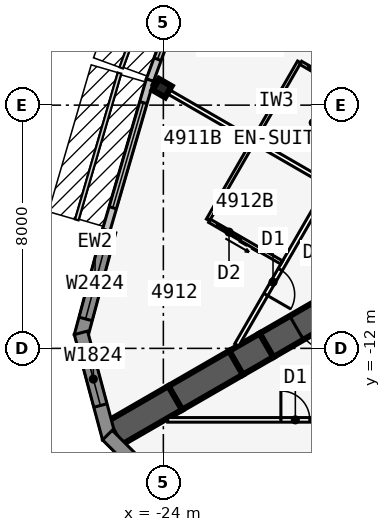
"""IFC4 building model, lengths in metres.
Left out: names, types, materials, properties, quantities, classifications, styles, units other than length and angle.
Written with IfcOpenShell. Run it as: python <this file> out.ifc"""

import sys

from ifc_helpers import new_model, si_unit, direction, frame, frame_2d, origin, origin_2d, place, context, subcontext, project, spatial, polyline, rectangle, i_section, outline, extrude, element, fill, save


model = new_model("IFC4")
c1 = context("Model", 3, precision=1e-05, world=origin(), true_north=direction((0.0, 1.0)))
c2 = subcontext(c1, "Body", "Model", "MODEL_VIEW")
j1 = project(units=[si_unit("LENGTHUNIT", "METRE"), si_unit("PLANEANGLEUNIT", "RADIAN")], contexts=[c1])
p1 = place(None, origin())
s1 = spatial("IfcSite", under=j1, at=p1, CompositionType="ELEMENT")
p2 = place(p1, origin())
s2 = spatial("IfcBuilding", under=s1, at=p2, CompositionType="ELEMENT")
p3 = place(p2, frame((0.0, 0.0, 182.7)))
s3 = spatial("IfcBuildingStorey", under=s2, at=p3, CompositionType="ELEMENT", Elevation=182.7)
p4 = place(p3, frame((-16.5, -9.526, 0.0), z_axis=(0.0, 0.0, 1.0), x_axis=(-0.866031398331, -0.499989616998, 0.0)))
e1 = element("IfcWall", 1, at=p4, inside=s3, PredefinedType="SHEAR", context=c2, shape_type="SweptSolid", body=[
    extrude(rectangle(XDim=4.746, YDim=0.9, at=frame_2d((2.373, 0.0))), origin(), (0.0, 0.0, 1.0), 3.4),
])
p5 = place(p4, frame((1.8, 0.0, 0.0)))
e2 = element("IfcOpeningElement", 2, at=p5, cuts=e1, PredefinedType="OPENING", context=c2, shape_type="SweptSolid", body=[
    extrude(rectangle(XDim=1.8, YDim=2.13, at=frame_2d((0.9, 1.065))), frame((0.0, 0.46, 0.0), z_axis=(0.0, -1.0, 0.0), x_axis=(1.0, 0.0, 0.0)), (0.0, 0.0, 1.0), 0.92),
])
p6 = place(p3, frame((-20.61, -11.899, 0.0), z_axis=(0.0, 0.0, 1.0), x_axis=(-0.866009537788, -0.500027479704, 0.0)))
e3 = element("IfcWall", 3, at=p6, inside=s3, PredefinedType="SHEAR", context=c2, shape_type="SweptSolid", body=[
    extrude(rectangle(XDim=1.155, YDim=0.9, at=frame_2d((0.577, 0.0))), origin(), (0.0, 0.0, 1.0), 3.4),
])
for number, where, z_axis, x_axis in (
    (4, (-21.61, -12.477, 0.0), (0.0, 0.0, 1.0), (-0.866, -0.5, 0.0)),
    (5, (-23.61, -13.631, 0.0), (0.0, 0.0, 1.0), (-0.866, -0.5, 0.0)),
):
    element("IfcWall", number, at=place(p3, frame(where, z_axis=z_axis, x_axis=x_axis)), inside=s3, PredefinedType="SHEAR", context=c2, shape_type="SweptSolid", body=[
        extrude(rectangle(XDim=2.309, YDim=0.9, at=frame_2d((1.155, 0.0))), origin(), (0.0, 0.0, 1.0), 3.4),
    ])
p7 = place(p3, frame((-24.041, -3.44, 0.0), z_axis=(0.0, 0.0, 1.0), x_axis=(-0.5, -0.866025403784, 0.0)))
e6 = element("IfcColumn", 6, at=p7, inside=s3, PredefinedType="COLUMN", context=c2, shape_type="SweptSolid", body=[
    extrude(i_section(OverallWidth=0.424, OverallDepth=0.475, WebThickness=0.048, FlangeThickness=0.077, at=origin_2d()), origin(), (0.0, 0.0, 1.0), 3.4),
])
p8 = place(p3, frame((-22.701, 1.584, 0.0), z_axis=(0.0, 0.0, 1.0), x_axis=(-0.343225593282, -0.939252996863, 0.0)))
e7 = element("IfcWall", 7, at=p8, inside=s3, PredefinedType="STANDARD", context=c2, shape_type="SweptSolid", body=[
    extrude(rectangle(XDim=5.076, YDim=0.25, at=frame_2d((2.538, 0.0))), origin(), (0.0, 0.0, 1.0), 3.235),
])
p9 = place(p8, frame((0.738, 0.0, 0.45)))
e8 = element("IfcOpeningElement", 8, at=p9, cuts=e7, PredefinedType="OPENING", context=c2, shape_type="SweptSolid", body=[
    extrude(rectangle(XDim=3.6, YDim=2.4, at=frame_2d((1.8, 1.2))), frame((0.0, 0.135, 0.0), z_axis=(0.0, -1.0, 0.0), x_axis=(1.0, 0.0, 0.0)), (0.0, 0.0, 1.0), 0.27),
])
p10 = place(p3, frame((-24.441, -3.175, 0.0), z_axis=(0.0, 0.0, 1.0), x_axis=(-0.279528287117, -0.960137457191, 0.0)))
e9 = element("IfcWall", 9, at=p10, inside=s3, PredefinedType="STANDARD", context=c2, shape_type="SweptSolid", body=[
    extrude(rectangle(XDim=5.148, YDim=0.25, at=frame_2d((2.574, 0.0))), origin(), (0.0, 0.0, 1.0), 3.235),
])
p11 = place(p10, frame((0.774, 0.0, 0.45)))
e10 = element("IfcOpeningElement", 10, at=p11, cuts=e9, PredefinedType="OPENING", context=c2, shape_type="SweptSolid", body=[
    extrude(rectangle(XDim=3.6, YDim=2.4, at=frame_2d((1.8, 1.2))), frame((0.0, 0.135, 0.0), z_axis=(0.0, -1.0, 0.0), x_axis=(1.0, 0.0, 0.0)), (0.0, 0.0, 1.0), 0.27),
])
p12 = place(p3, frame((-25.783, -8.141, 0.0), z_axis=(0.0, 0.0, 1.0), x_axis=(-0.258823421857, -0.965924653531, 0.0)))
e11 = element("IfcWall", 11, at=p12, inside=s3, PredefinedType="SOLIDWALL", context=c2, shape_type="SweptSolid", body=[
    extrude(rectangle(XDim=3.586, YDim=0.45, at=frame_2d((1.793, 0.0))), origin(), (0.0, 0.0, 1.0), 3.235),
])
p13 = place(p12, frame((0.593, 0.0, 0.45)))
e12 = element("IfcOpeningElement", 12, at=p13, cuts=e11, PredefinedType="OPENING", context=c2, shape_type="SweptSolid", body=[
    extrude(rectangle(XDim=2.4, YDim=2.4, at=frame_2d((1.2, 1.2))), frame((0.0, 0.235, 0.0), z_axis=(0.0, -1.0, 0.0), x_axis=(1.0, 0.0, 0.0)), (0.0, 0.0, 1.0), 0.47),
])
p14 = place(p3, frame((-26.711, -11.489, 0.0), z_axis=(0.0, 0.0, 1.0), x_axis=(0.258823421857, -0.965924653531, 0.0)))
e13 = element("IfcWall", 13, at=p14, inside=s3, PredefinedType="SOLIDWALL", context=c2, shape_type="SweptSolid", body=[
    extrude(outline(polyline([(3.586, 0.225), (3.527, 0.225), (3.035, 0.093), (3.0, 0.225), (0.0, 0.225), (0.0, -0.225), (3.586, -0.225), (3.586, 0.225)])), origin(), (0.0, 0.0, 1.0), 3.235),
])
p15 = place(p14, frame((0.675, 0.0, 0.45)))
e14 = element("IfcOpeningElement", 14, at=p15, cuts=e13, PredefinedType="OPENING", context=c2, shape_type="SweptSolid", body=[
    extrude(rectangle(XDim=1.8, YDim=2.4, at=frame_2d((0.9, 1.2))), frame((0.0, 0.235, 0.0), z_axis=(0.0, -1.0, 0.0), x_axis=(1.0, 0.0, 0.0)), (0.0, 0.0, 1.0), 0.47),
])
p16 = place(p3, frame((-25.841, -14.852, 0.0), z_axis=(0.0, 0.0, 1.0), x_axis=(0.707106781187, -0.707106781187, 0.0)))
e15 = element("IfcWall", 15, at=p16, inside=s3, PredefinedType="SOLIDWALL", context=c2, shape_type="SweptSolid", body=[
    extrude(outline(polyline([(3.586, 0.225), (0.586, 0.225), (0.551, 0.093), (0.059, 0.225), (0.0, 0.225), (0.0, -0.225), (3.586, -0.225), (3.586, 0.225)])), origin(), (0.0, 0.0, 1.0), 3.235),
])
p17 = place(p16, frame((1.111, 0.0, 0.45)))
e16 = element("IfcOpeningElement", 16, at=p17, cuts=e15, PredefinedType="OPENING", context=c2, shape_type="SweptSolid", body=[
    extrude(rectangle(XDim=1.8, YDim=2.4, at=frame_2d((0.9, 1.2))), frame((0.0, 0.235, 0.0), z_axis=(0.0, -1.0, 0.0), x_axis=(1.0, 0.0, 0.0)), (0.0, 0.0, 1.0), 0.47),
])
p18 = place(p3, frame((-23.857, -14.351, 0.0), z_axis=(0.0, 0.0, 1.0), x_axis=(1.0, 0.0, 0.0)))
e17 = element("IfcWall", 17, at=p18, inside=s3, PredefinedType="PARTITIONING", context=c2, shape_type="SweptSolid", body=[
    extrude(rectangle(XDim=47.714, YDim=0.15, at=frame_2d((23.857, 0.0))), origin(), (0.0, 0.0, 1.0), 3.235),
])
p19 = place(p18, frame((3.723, 0.0, 0.0)))
e18 = element("IfcOpeningElement", 18, at=p19, cuts=e17, PredefinedType="OPENING", context=c2, shape_type="SweptSolid", body=[
    extrude(rectangle(XDim=0.95, YDim=2.13, at=frame_2d((0.475, 1.065))), frame((0.0, 0.085, 0.0), z_axis=(0.0, -1.0, 0.0), x_axis=(1.0, 0.0, 0.0)), (0.0, 0.0, 1.0), 0.17),
])
p20 = place(p18, frame((17.082, 0.0, 0.0)))
e19 = element("IfcOpeningElement", 19, at=p20, cuts=e17, PredefinedType="OPENING", context=c2, shape_type="SweptSolid", body=[
    extrude(rectangle(XDim=0.95, YDim=2.13, at=frame_2d((0.475, 1.065))), frame((0.0, 0.085, 0.0), z_axis=(0.0, -1.0, 0.0), x_axis=(1.0, 0.0, 0.0)), (0.0, 0.0, 1.0), 0.17),
])
p21 = place(p18, frame((25.857, 0.0, 0.0)))
e20 = element("IfcOpeningElement", 20, at=p21, cuts=e17, PredefinedType="OPENING", context=c2, shape_type="SweptSolid", body=[
    extrude(rectangle(XDim=1.0, YDim=2.13, at=frame_2d((0.5, 1.065))), frame((0.0, 0.085, 0.0), z_axis=(0.0, -1.0, 0.0), x_axis=(1.0, 0.0, 0.0)), (0.0, 0.0, 1.0), 0.17),
])
p22 = place(p18, frame((30.882, 0.0, 0.0)))
e21 = element("IfcOpeningElement", 21, at=p22, cuts=e17, PredefinedType="OPENING", context=c2, shape_type="SweptSolid", body=[
    extrude(rectangle(XDim=0.95, YDim=2.13, at=frame_2d((0.475, 1.065))), frame((0.0, 0.085, 0.0), z_axis=(0.0, -1.0, 0.0), x_axis=(1.0, 0.0, 0.0)), (0.0, 0.0, 1.0), 0.17),
])
p23 = place(p18, frame((42.082, 0.0, 0.0)))
e22 = element("IfcOpeningElement", 22, at=p23, cuts=e17, PredefinedType="OPENING", context=c2, shape_type="SweptSolid", body=[
    extrude(rectangle(XDim=0.95, YDim=2.13, at=frame_2d((0.475, 1.065))), frame((0.0, 0.085, 0.0), z_axis=(0.0, -1.0, 0.0), x_axis=(1.0, 0.0, 0.0)), (0.0, 0.0, 1.0), 0.17),
])
p24 = place(p3, frame((-0.5, 24.636, 0.0), z_axis=(0.0, 0.0, 1.0), x_axis=(-0.500001915564, -0.86602429783, 0.0)))
e23 = element("IfcWall", 23, at=p24, inside=s3, PredefinedType="PARTITIONING", context=c2, shape_type="SweptSolid", body=[
    extrude(rectangle(XDim=42.172, YDim=0.15, at=frame_2d((21.086, 0.0))), origin(), (0.0, 0.0, 1.0), 3.235),
])
p25 = place(p24, frame((2.338, 0.0, 0.0)))
e24 = element("IfcOpeningElement", 24, at=p25, cuts=e23, PredefinedType="OPENING", context=c2, shape_type="SweptSolid", body=[
    extrude(rectangle(XDim=0.95, YDim=2.13, at=frame_2d((0.475, 1.065))), frame((0.0, 0.085, 0.0), z_axis=(0.0, -1.0, 0.0), x_axis=(1.0, 0.0, 0.0)), (0.0, 0.0, 1.0), 0.17),
])
p26 = place(p24, frame((18.111, 0.0, 0.0)))
e25 = element("IfcOpeningElement", 25, at=p26, cuts=e23, PredefinedType="OPENING", context=c2, shape_type="SweptSolid", body=[
    extrude(rectangle(XDim=0.95, YDim=2.13, at=frame_2d((0.475, 1.065))), frame((0.0, 0.085, 0.0), z_axis=(0.0, -1.0, 0.0), x_axis=(1.0, 0.0, 0.0)), (0.0, 0.0, 1.0), 0.17),
])
p27 = place(p24, frame((28.111, 0.0, 0.0)))
e26 = element("IfcOpeningElement", 26, at=p27, cuts=e23, PredefinedType="OPENING", context=c2, shape_type="SweptSolid", body=[
    extrude(rectangle(XDim=0.95, YDim=2.13, at=frame_2d((0.475, 1.065))), frame((0.0, 0.085, 0.0), z_axis=(0.0, -1.0, 0.0), x_axis=(1.0, 0.0, 0.0)), (0.0, 0.0, 1.0), 0.17),
])
p28 = place(p24, frame((39.311, 0.0, 0.0)))
e27 = element("IfcOpeningElement", 27, at=p28, cuts=e23, PredefinedType="OPENING", context=c2, shape_type="SweptSolid", body=[
    extrude(rectangle(XDim=0.95, YDim=2.13, at=frame_2d((0.475, 1.065))), frame((0.0, 0.085, 0.0), z_axis=(0.0, -1.0, 0.0), x_axis=(1.0, 0.0, 0.0)), (0.0, 0.0, 1.0), 0.17),
])
p29 = place(p3, frame((-16.108, -2.247, 0.0), z_axis=(0.0, 0.0, 1.0), x_axis=(-0.866025567496, 0.499999716443, 0.0)))
e28 = element("IfcWall", 28, at=p29, inside=s3, PredefinedType="PARTITIONING", context=c2, shape_type="SweptSolid", body=[
    extrude(rectangle(XDim=7.495, YDim=0.1, at=frame_2d((3.748, 0.0))), origin(), (0.0, 0.0, 1.0), 2.389),
])
p30 = place(p29, frame((0.45, 0.0, 0.0)))
e29 = element("IfcOpeningElement", 29, at=p30, cuts=e28, PredefinedType="OPENING", context=c2, shape_type="SweptSolid", body=[
    extrude(rectangle(XDim=0.9, YDim=2.13, at=frame_2d((0.45, 1.065))), frame((0.0, 0.06, 0.0), z_axis=(0.0, -1.0, 0.0), x_axis=(1.0, 0.0, 0.0)), (0.0, 0.0, 1.0), 0.12),
])
p31 = place(p3, frame((-18.608, -6.577, 0.0), z_axis=(0.0, 0.0, 1.0), x_axis=(-0.866031967744, 0.499988630717, 0.0)))
e30 = element("IfcWall", 30, at=p31, inside=s3, PredefinedType="PARTITIONING", context=c2, shape_type="SweptSolid", body=[
    extrude(rectangle(XDim=6.616, YDim=0.15, at=frame_2d((3.308, 0.0))), origin(), (0.0, 0.0, 1.0), 2.389),
])
p32 = place(p3, frame((-19.533, -2.579, 0.0), z_axis=(0.0, 0.0, 1.0), x_axis=(-0.499990139034, -0.866031096941, 0.0)))
e31 = element("IfcWall", 31, at=p32, inside=s3, PredefinedType="PLUMBINGWALL", context=c2, shape_type="SweptSolid", body=[
    extrude(rectangle(XDim=3.0, YDim=0.12, at=frame_2d((1.5, 0.0))), origin(), (0.0, 0.0, 1.0), 3.235),
])
p33 = place(p3, frame((-17.108, -3.979, 0.0), z_axis=(0.0, 0.0, 1.0), x_axis=(-0.865997131366, 0.500048966069, 0.0)))
e32 = element("IfcWall", 32, at=p33, inside=s3, PredefinedType="PLUMBINGWALL", context=c2, shape_type="SweptSolid", body=[
    extrude(rectangle(XDim=2.74, YDim=0.12, at=frame_2d((1.37, 0.0))), origin(), (0.0, 0.0, 1.0), 3.235),
])
p34 = place(p33, frame((1.55, 0.0, 0.0)))
e33 = element("IfcOpeningElement", 33, at=p34, cuts=e32, PredefinedType="OPENING", context=c2, shape_type="SweptSolid", body=[
    extrude(rectangle(XDim=0.9, YDim=2.13, at=frame_2d((0.45, 1.065))), frame((0.0, 0.07, 0.0), z_axis=(0.0, -1.0, 0.0), x_axis=(1.0, 0.0, 0.0)), (0.0, 0.0, 1.0), 0.14),
])
p35 = place(p3, frame((-21.033, -5.177, 0.0), z_axis=(0.0, 0.0, 1.0), x_axis=(-0.499990139034, -0.866031096941, 0.0)))
e34 = element("IfcWall", 34, at=p35, inside=s3, PredefinedType="PLUMBINGWALL", context=c2, shape_type="SweptSolid", body=[
    extrude(rectangle(XDim=3.0, YDim=0.12, at=frame_2d((1.5, 0.0))), origin(), (0.0, 0.0, 1.0), 3.235),
])
p36 = place(p3, frame((-20.108, -9.175, 0.0), z_axis=(0.0, 0.0, 1.0), x_axis=(-0.866035715982, 0.499982138324, 0.0)))
e35 = element("IfcWall", 35, at=p36, inside=s3, PredefinedType="PLUMBINGWALL", context=c2, shape_type="SweptSolid", body=[
    extrude(rectangle(XDim=2.74, YDim=0.12, at=frame_2d((1.37, 0.0))), origin(), (0.0, 0.0, 1.0), 3.235),
])
p37 = place(p36, frame((1.55, 0.0, 0.0)))
e36 = element("IfcOpeningElement", 36, at=p37, cuts=e35, PredefinedType="OPENING", context=c2, shape_type="SweptSolid", body=[
    extrude(rectangle(XDim=0.9, YDim=2.13, at=frame_2d((0.45, 1.065))), frame((0.0, 0.07, 0.0), z_axis=(0.0, -1.0, 0.0), x_axis=(1.0, 0.0, 0.0)), (0.0, 0.0, 1.0), 0.14),
])
p38 = place(p9, origin())
e37 = element("IfcWindow", 37, at=p38, inside=s3, PartitioningType="SINGLE_PANEL", PredefinedType="WINDOW", context=c2, shape_type="SweptSolid", body=[
    extrude(rectangle(XDim=3.6, YDim=2.4, at=frame_2d((1.8, 1.2))), frame((0.0, 0.03, 0.0), z_axis=(0.0, -1.0, 0.0), x_axis=(1.0, 0.0, 0.0)), (0.0, 0.0, 1.0), 0.06),
])
fill(e8, e37)
p39 = place(p11, origin())
e38 = element("IfcWindow", 38, at=p39, inside=s3, PartitioningType="SINGLE_PANEL", PredefinedType="WINDOW", context=c2, shape_type="SweptSolid", body=[
    extrude(rectangle(XDim=3.6, YDim=2.4, at=frame_2d((1.8, 1.2))), frame((0.0, 0.03, 0.0), z_axis=(0.0, -1.0, 0.0), x_axis=(1.0, 0.0, 0.0)), (0.0, 0.0, 1.0), 0.06),
])
fill(e10, e38)
p40 = place(p13, origin())
e39 = element("IfcWindow", 39, at=p40, inside=s3, PartitioningType="SINGLE_PANEL", PredefinedType="WINDOW", context=c2, shape_type="SweptSolid", body=[
    extrude(rectangle(XDim=2.4, YDim=2.4, at=frame_2d((1.2, 1.2))), frame((0.0, 0.03, 0.0), z_axis=(0.0, -1.0, 0.0), x_axis=(1.0, 0.0, 0.0)), (0.0, 0.0, 1.0), 0.06),
])
fill(e12, e39)
p41 = place(p15, origin())
e40 = element("IfcWindow", 40, at=p41, inside=s3, PartitioningType="SINGLE_PANEL", PredefinedType="WINDOW", context=c2, shape_type="SweptSolid", body=[
    extrude(rectangle(XDim=1.8, YDim=2.4, at=frame_2d((0.9, 1.2))), frame((0.0, 0.03, 0.0), z_axis=(0.0, -1.0, 0.0), x_axis=(1.0, 0.0, 0.0)), (0.0, 0.0, 1.0), 0.06),
])
fill(e14, e40)
p42 = place(p19, origin())
e41 = element("IfcDoor", 41, at=p42, inside=s3, OperationType="SINGLE_SWING_LEFT", PredefinedType="DOOR", context=c2, shape_type="SweptSolid", body=[
    extrude(rectangle(XDim=0.95, YDim=2.13, at=frame_2d((0.475, 1.065))), frame((0.0, 0.025, 0.0), z_axis=(0.0, -1.0, 0.0), x_axis=(1.0, 0.0, 0.0)), (0.0, 0.0, 1.0), 0.05),
])
fill(e18, e41)
p43 = place(p34, origin())
e42 = element("IfcDoor", 42, at=p43, inside=s3, OperationType="SLIDING_TO_LEFT", PredefinedType="DOOR", context=c2, shape_type="SweptSolid", body=[
    extrude(rectangle(XDim=0.9, YDim=2.13, at=frame_2d((0.45, 1.065))), frame((0.0, 0.025, 0.0), z_axis=(0.0, -1.0, 0.0), x_axis=(1.0, 0.0, 0.0)), (0.0, 0.0, 1.0), 0.05),
])
fill(e33, e42)
p44 = place(p37, origin())
e43 = element("IfcDoor", 43, at=p44, inside=s3, OperationType="SLIDING_TO_LEFT", PredefinedType="DOOR", context=c2, shape_type="SweptSolid", body=[
    extrude(rectangle(XDim=0.9, YDim=2.13, at=frame_2d((0.45, 1.065))), frame((0.0, 0.025, 0.0), z_axis=(0.0, -1.0, 0.0), x_axis=(1.0, 0.0, 0.0)), (0.0, 0.0, 1.0), 0.05),
])
fill(e36, e43)
p45 = place(p28, origin())
e44 = element("IfcDoor", 44, at=p45, inside=s3, OperationType="SINGLE_SWING_RIGHT", PredefinedType="DOOR", context=c2, shape_type="SweptSolid", body=[
    extrude(rectangle(XDim=0.95, YDim=2.13, at=frame_2d((0.475, 1.065))), frame((0.0, 0.025, 0.0), z_axis=(0.0, -1.0, 0.0), x_axis=(1.0, 0.0, 0.0)), (0.0, 0.0, 1.0), 0.05),
])
fill(e27, e44)
p46 = place(p5, origin())
e45 = element("IfcDoor", 45, at=p46, inside=s3, OperationType="DOUBLE_DOOR_DOUBLE_SWING", PredefinedType="DOOR", context=c2, shape_type="SweptSolid", body=[
    extrude(rectangle(XDim=1.8, YDim=2.13, at=frame_2d((0.9, 1.065))), frame((0.0, 0.025, 0.0), z_axis=(0.0, -1.0, 0.0), x_axis=(1.0, 0.0, 0.0)), (0.0, 0.0, 1.0), 0.05),
])
fill(e2, e45)
save(model, sys.argv[1])
